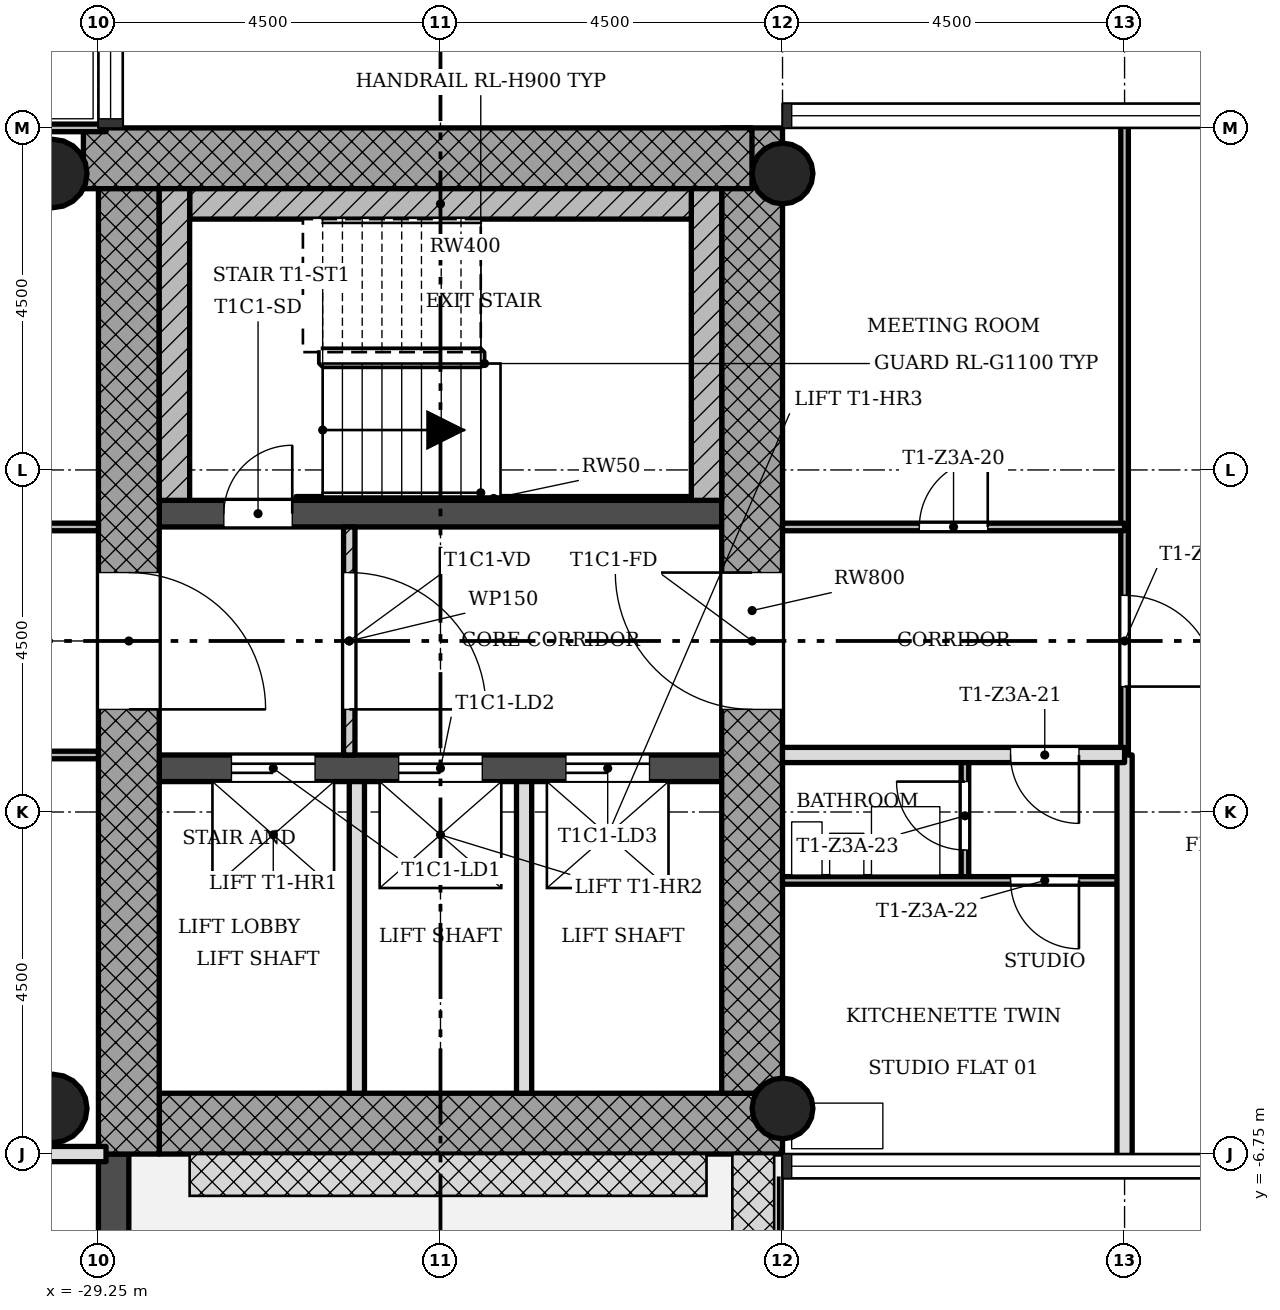
"""IFC4 building model, lengths in metres.
Left out: names, types, materials, properties, quantities, classifications, styles, units other than length and angle.
Written with IfcOpenShell. Run it as: python <this file> out.ifc"""

import sys

from ifc_helpers import new_model, si_unit, direction, frame, frame_2d, origin, origin_2d, place, context, subcontext, project, spatial, rectangle, hollow_circle, extrude, element, fill, save


model = new_model("IFC4")
c1 = context("Model", 3, precision=1e-05, world=origin(), true_north=direction((0.0, 1.0)))
c2 = subcontext(c1, "Body", "Model", "MODEL_VIEW")
j1 = project(units=[si_unit("LENGTHUNIT", "METRE"), si_unit("PLANEANGLEUNIT", "RADIAN")], contexts=[c1])
p1 = place(None, origin())
s1 = spatial("IfcSite", under=j1, at=p1, CompositionType="ELEMENT")
p2 = place(p1, origin())
s2 = spatial("IfcBuilding", under=s1, at=p2, CompositionType="ELEMENT")
p3 = place(p2, frame((0.0, 0.0, 140.5)))
s3 = spatial("IfcBuildingStorey", under=s2, at=p3, CompositionType="ELEMENT", Elevation=140.5)
p4 = place(p3, frame((-28.45, -6.35, 0.0), z_axis=(0.0, 0.0, 1.0), x_axis=(1.0, 0.0, 0.0)))
e1 = element("IfcWall", 1, at=p4, inside=s3, PredefinedType="SHEAR", context=c2, shape_type="SweptSolid", body=[
    extrude(rectangle(XDim=8.2, YDim=0.8, at=frame_2d((4.1, 0.0))), origin(), (0.0, 0.0, 1.0), 3.4),
])
p5 = place(p3, frame((-20.65, -5.95, 0.0), z_axis=(0.0, 0.0, 1.0), x_axis=(0.0, 1.0, 0.0)))
e2 = element("IfcWall", 2, at=p5, inside=s3, PredefinedType="SHEAR", context=c2, shape_type="SweptSolid", body=[
    extrude(rectangle(XDim=12.7, YDim=0.8, at=frame_2d((6.35, 0.0))), origin(), (0.0, 0.0, 1.0), 3.4),
])
p6 = place(p5, frame((5.05, 0.0, 0.0)))
e3 = element("IfcOpeningElement", 3, at=p6, cuts=e2, PredefinedType="OPENING", context=c2, shape_type="SweptSolid", body=[
    extrude(rectangle(XDim=1.8, YDim=2.1, at=frame_2d((0.9, 1.05))), frame((0.0, 0.41, 0.0), z_axis=(0.0, -1.0, 0.0), x_axis=(1.0, 0.0, 0.0)), (0.0, 0.0, 1.0), 0.82),
])
p7 = place(p3, frame((-20.652, 6.35, 0.0), z_axis=(0.0, 0.0, 1.0), x_axis=(-1.0, 0.0, 0.0)))
e4 = element("IfcWall", 4, at=p7, inside=s3, PredefinedType="SHEAR", context=c2, shape_type="SweptSolid", body=[
    extrude(rectangle(XDim=8.796, YDim=0.8, at=frame_2d((4.398, 0.0))), origin(), (0.0, 0.0, 1.0), 3.4),
])
p8 = place(p3, frame((-28.85, 5.95, 0.0), z_axis=(0.0, 0.0, 1.0), x_axis=(0.0, -1.0, 0.0)))
e5 = element("IfcWall", 5, at=p8, inside=s3, PredefinedType="SHEAR", context=c2, shape_type="SweptSolid", body=[
    extrude(rectangle(XDim=12.7, YDim=0.8, at=frame_2d((6.35, 0.0))), origin(), (0.0, 0.0, 1.0), 3.4),
])
p9 = place(p8, frame((5.05, 0.0, 0.0)))
e6 = element("IfcOpeningElement", 6, at=p9, cuts=e5, PredefinedType="OPENING", context=c2, shape_type="SweptSolid", body=[
    extrude(rectangle(XDim=1.8, YDim=2.1, at=frame_2d((0.9, 1.05))), frame((0.0, 0.41, 0.0), z_axis=(0.0, -1.0, 0.0), x_axis=(1.0, 0.0, 0.0)), (0.0, 0.0, 1.0), 0.82),
])
p10 = place(p3, frame((-28.45, -1.675, 0.0), z_axis=(0.0, 0.0, 1.0), x_axis=(1.0, 0.0, 0.0)))
e7 = element("IfcWall", 7, at=p10, inside=s3, PredefinedType="SHEAR", context=c2, shape_type="SweptSolid", body=[
    extrude(rectangle(XDim=7.4, YDim=0.35, at=frame_2d((3.7, 0.0))), origin(), (0.0, 0.0, 1.0), 3.4),
])
p11 = place(p10, frame((0.95, 0.0, 0.0)))
e8 = element("IfcOpeningElement", 8, at=p11, cuts=e7, PredefinedType="OPENING", context=c2, shape_type="SweptSolid", body=[
    extrude(rectangle(XDim=1.1, YDim=2.1, at=frame_2d((0.55, 1.05))), frame((0.0, 0.185, 0.0), z_axis=(0.0, -1.0, 0.0), x_axis=(1.0, 0.0, 0.0)), (0.0, 0.0, 1.0), 0.37),
])
p12 = place(p10, frame((3.15, 0.0, 0.0)))
e9 = element("IfcOpeningElement", 9, at=p12, cuts=e7, PredefinedType="OPENING", context=c2, shape_type="SweptSolid", body=[
    extrude(rectangle(XDim=1.1, YDim=2.1, at=frame_2d((0.55, 1.05))), frame((0.0, 0.185, 0.0), z_axis=(0.0, -1.0, 0.0), x_axis=(1.0, 0.0, 0.0)), (0.0, 0.0, 1.0), 0.37),
])
p13 = place(p10, frame((5.35, 0.0, 0.0)))
e10 = element("IfcOpeningElement", 10, at=p13, cuts=e7, PredefinedType="OPENING", context=c2, shape_type="SweptSolid", body=[
    extrude(rectangle(XDim=1.1, YDim=2.1, at=frame_2d((0.55, 1.05))), frame((0.0, 0.185, 0.0), z_axis=(0.0, -1.0, 0.0), x_axis=(1.0, 0.0, 0.0)), (0.0, 0.0, 1.0), 0.37),
])
p14 = place(p3, frame((-28.45, 1.675, 0.0), z_axis=(0.0, 0.0, 1.0), x_axis=(1.0, 0.0, 0.0)))
e11 = element("IfcWall", 11, at=p14, inside=s3, PredefinedType="SHEAR", context=c2, shape_type="SweptSolid", body=[
    extrude(rectangle(XDim=7.4, YDim=0.35, at=frame_2d((3.7, 0.0))), origin(), (0.0, 0.0, 1.0), 3.4),
])
p15 = place(p14, frame((0.85, 0.0, 0.0)))
e12 = element("IfcOpeningElement", 12, at=p15, cuts=e11, PredefinedType="OPENING", context=c2, shape_type="SweptSolid", body=[
    extrude(rectangle(XDim=0.9, YDim=2.1, at=frame_2d((0.45, 1.05))), frame((0.0, 0.185, 0.0), z_axis=(0.0, -1.0, 0.0), x_axis=(1.0, 0.0, 0.0)), (0.0, 0.0, 1.0), 0.37),
])
for number, where, z_axis, x_axis in (
    (13, (-20.25, -6.15, 0.0), (0.0, 0.0, 1.0), (1.0, 0.0, 0.0)),
    (14, (-20.25, 6.15, 0.0), (0.0, 0.0, 1.0), (1.0, 0.0, 0.0)),
):
    element("IfcColumn", number, at=place(p3, frame(where, z_axis=z_axis, x_axis=x_axis)), inside=s3, PredefinedType="COLUMN", context=c2, shape_type="SweptSolid", body=[
        extrude(hollow_circle(Radius=0.4, WallThickness=0.028, at=origin_2d()), origin(), (0.0, 0.0, 1.0), 3.4),
    ])
for number, where, z_axis, x_axis in (
    (15, (-29.85, -6.15, 0.0), (0.0, 0.0, 1.0), (1.0, 0.0, 0.0)),
    (16, (-29.85, 6.15, 0.0), (0.0, 0.0, 1.0), (1.0, 0.0, 0.0)),
):
    element("IfcColumn", number, at=place(p3, frame(where, z_axis=z_axis, x_axis=x_axis)), inside=s3, PredefinedType="COLUMN", context=c2, shape_type="SweptSolid", body=[
        extrude(hollow_circle(Radius=0.45, WallThickness=0.032, at=origin_2d()), origin(), (0.0, 0.0, 1.0), 3.4),
    ])
p16 = place(p3, frame((-29.05, -11.25, -0.02), z_axis=(0.0, 0.0, 1.0), x_axis=(0.0, 1.0, 0.0)))
e17 = element("IfcWall", 17, at=p16, inside=s3, PredefinedType="STANDARD", context=c2, shape_type="SweptSolid", body=[
    extrude(rectangle(XDim=4.5, YDim=0.4, at=frame_2d((2.25, 0.0))), origin(), (0.0, 0.0, 1.0), 3.12),
])
p17 = place(p16, frame((1.35, 0.0, 0.02)))
e18 = element("IfcOpeningElement", 18, at=p17, cuts=e17, PredefinedType="OPENING", context=c2, shape_type="SweptSolid", body=[
    extrude(rectangle(XDim=1.8, YDim=2.1, at=frame_2d((0.9, 1.05))), frame((0.0, 0.21, 0.0), z_axis=(0.0, -1.0, 0.0), x_axis=(1.0, 0.0, 0.0)), (0.0, 0.0, 1.0), 0.42),
])
p18 = place(p3, frame((-25.95, -1.5, 0.0), z_axis=(0.0, 0.0, 1.0), x_axis=(0.0, 1.0, 0.0)))
e19 = element("IfcWall", 19, at=p18, inside=s3, PredefinedType="PARTITIONING", context=c2, shape_type="SweptSolid", body=[
    extrude(rectangle(XDim=3.0, YDim=0.15, at=frame_2d((1.5, 0.0))), origin(), (0.0, 0.0, 1.0), 3.0),
])
p19 = place(p18, frame((0.6, 0.0, 0.0)))
e20 = element("IfcOpeningElement", 20, at=p19, cuts=e19, PredefinedType="OPENING", context=c2, shape_type="SweptSolid", body=[
    extrude(rectangle(XDim=1.8, YDim=2.1, at=frame_2d((0.9, 1.05))), frame((0.0, 0.085, 0.0), z_axis=(0.0, -1.0, 0.0), x_axis=(1.0, 0.0, 0.0)), (0.0, 0.0, 1.0), 0.17),
])
for number, where, z_axis, x_axis in (
    (21, (-25.85, -5.95, 0.0), (0.0, 0.0, 1.0), (0.0, 1.0, 0.0)),
    (22, (-23.65, -5.95, 0.0), (0.0, 0.0, 1.0), (0.0, 1.0, 0.0)),
):
    element("IfcWall", number, at=place(p3, frame(where, z_axis=z_axis, x_axis=x_axis)), inside=s3, PredefinedType="SOLIDWALL", context=c2, shape_type="SweptSolid", body=[
        extrude(rectangle(XDim=4.1, YDim=0.2, at=frame_2d((2.05, 0.0))), origin(), (0.0, 0.0, 1.0), 3.0),
    ])
p20 = place(p3, frame((-17.85, -3.15, 0.0), z_axis=(0.0, 0.0, 1.0), x_axis=(0.0, 1.0, 0.0)))
e23 = element("IfcWall", 23, at=p20, inside=s3, PredefinedType="PARTITIONING", context=c2, shape_type="SweptSolid", body=[
    extrude(rectangle(XDim=1.65, YDim=0.1, at=frame_2d((0.825, 0.0))), origin(), (0.0, 0.0, 1.0), 3.0),
])
p21 = place(p20, frame((0.4, 0.0, 0.0)))
e24 = element("IfcOpeningElement", 24, at=p21, cuts=e23, PredefinedType="OPENING", context=c2, shape_type="SweptSolid", body=[
    extrude(rectangle(XDim=0.9, YDim=2.1, at=frame_2d((0.45, 1.05))), frame((0.0, 0.06, 0.0), z_axis=(0.0, -1.0, 0.0), x_axis=(1.0, 0.0, 0.0)), (0.0, 0.0, 1.0), 0.12),
])
p22 = place(p3, frame((-15.75, -1.5, 0.0), z_axis=(0.0, 0.0, 1.0), x_axis=(0.0, 1.0, 0.0)))
e25 = element("IfcWall", 25, at=p22, inside=s3, PredefinedType="PARTITIONING", context=c2, shape_type="SweptSolid", body=[
    extrude(rectangle(XDim=8.35, YDim=0.1, at=frame_2d((4.175, 0.0))), origin(), (0.0, 0.0, 1.0), 3.0),
])
p23 = place(p22, frame((0.9, 0.0, 0.0)))
e26 = element("IfcOpeningElement", 26, at=p23, cuts=e25, PredefinedType="OPENING", context=c2, shape_type="SweptSolid", body=[
    extrude(rectangle(XDim=1.2, YDim=2.1, at=frame_2d((0.6, 1.05))), frame((0.0, 0.06, 0.0), z_axis=(0.0, -1.0, 0.0), x_axis=(1.0, 0.0, 0.0)), (0.0, 0.0, 1.0), 0.12),
])
p24 = place(p3, frame((-15.75, -6.85, 0.0), z_axis=(0.0, 0.0, 1.0), x_axis=(0.0, 1.0, 0.0)))
e27 = element("IfcWall", 27, at=p24, inside=s3, PredefinedType="SOLIDWALL", context=c2, shape_type="SweptSolid", body=[
    extrude(rectangle(XDim=5.35, YDim=0.2, at=frame_2d((2.675, 0.0))), origin(), (0.0, 0.0, 1.0), 3.0),
])
p25 = place(p3, frame((-42.85, -6.75, 0.0), z_axis=(0.0, 0.0, 1.0), x_axis=(1.0, 0.0, 0.0)))
e28 = element("IfcWall", 28, at=p25, inside=s3, PredefinedType="SOLIDWALL", context=c2, shape_type="SweptSolid", body=[
    extrude(rectangle(XDim=13.7, YDim=0.2, at=frame_2d((6.85, 0.0))), origin(), (0.0, 0.0, 1.0), 3.0),
])
p26 = place(p25, frame((6.4, 0.0, 0.0)))
e29 = element("IfcOpeningElement", 29, at=p26, cuts=e28, PredefinedType="OPENING", context=c2, shape_type="SweptSolid", body=[
    extrude(rectangle(XDim=0.9, YDim=2.1, at=frame_2d((0.45, 1.05))), frame((0.0, 0.11, 0.0), z_axis=(0.0, -1.0, 0.0), x_axis=(1.0, 0.0, 0.0)), (0.0, 0.0, 1.0), 0.22),
])
p27 = place(p3, frame((-20.25, -3.15, 0.0), z_axis=(0.0, 0.0, 1.0), x_axis=(1.0, 0.0, 0.0)))
e30 = element("IfcWall", 30, at=p27, inside=s3, PredefinedType="PARTITIONING", context=c2, shape_type="SweptSolid", body=[
    extrude(rectangle(XDim=4.5, YDim=0.1, at=frame_2d((2.25, 0.0))), origin(), (0.0, 0.0, 1.0), 3.0),
])
p28 = place(p27, frame((3.0, 0.0, 0.0)))
e31 = element("IfcOpeningElement", 31, at=p28, cuts=e30, PredefinedType="OPENING", context=c2, shape_type="SweptSolid", body=[
    extrude(rectangle(XDim=0.9, YDim=2.1, at=frame_2d((0.45, 1.05))), frame((0.0, 0.06, 0.0), z_axis=(0.0, -1.0, 0.0), x_axis=(1.0, 0.0, 0.0)), (0.0, 0.0, 1.0), 0.12),
])
p29 = place(p3, frame((-31.5, -1.5, 0.0), z_axis=(0.0, 0.0, 1.0), x_axis=(1.0, 0.0, 0.0)))
e32 = element("IfcWall", 32, at=p29, inside=s3, PredefinedType="PARTITIONING", context=c2, shape_type="SweptSolid", body=[
    extrude(rectangle(XDim=2.25, YDim=0.1, at=frame_2d((1.125, 0.0))), origin(), (0.0, 0.0, 1.0), 3.0),
])
p30 = place(p3, frame((-20.25, -1.5, 0.0), z_axis=(0.0, 0.0, 1.0), x_axis=(1.0, 0.0, 0.0)))
e33 = element("IfcWall", 33, at=p30, inside=s3, PredefinedType="SOLIDWALL", context=c2, shape_type="SweptSolid", body=[
    extrude(rectangle(XDim=4.5, YDim=0.2, at=frame_2d((2.25, 0.0))), origin(), (0.0, 0.0, 1.0), 3.0),
])
p31 = place(p30, frame((3.0, 0.0, 0.0)))
e34 = element("IfcOpeningElement", 34, at=p31, cuts=e33, PredefinedType="OPENING", context=c2, shape_type="SweptSolid", body=[
    extrude(rectangle(XDim=0.9, YDim=2.1, at=frame_2d((0.45, 1.05))), frame((0.0, 0.11, 0.0), z_axis=(0.0, -1.0, 0.0), x_axis=(1.0, 0.0, 0.0)), (0.0, 0.0, 1.0), 0.22),
])
p32 = place(p3, frame((-31.5, 1.5, 0.0), z_axis=(0.0, 0.0, 1.0), x_axis=(1.0, 0.0, 0.0)))
e35 = element("IfcWall", 35, at=p32, inside=s3, PredefinedType="PARTITIONING", context=c2, shape_type="SweptSolid", body=[
    extrude(rectangle(XDim=2.25, YDim=0.1, at=frame_2d((1.125, 0.0))), origin(), (0.0, 0.0, 1.0), 3.0),
])
p33 = place(p3, frame((-20.25, 1.5, 0.0), z_axis=(0.0, 0.0, 1.0), x_axis=(1.0, 0.0, 0.0)))
e36 = element("IfcWall", 36, at=p33, inside=s3, PredefinedType="PARTITIONING", context=c2, shape_type="SweptSolid", body=[
    extrude(rectangle(XDim=4.5, YDim=0.1, at=frame_2d((2.25, 0.0))), origin(), (0.0, 0.0, 1.0), 3.0),
])
p34 = place(p33, frame((1.8, 0.0, 0.0)))
e37 = element("IfcOpeningElement", 37, at=p34, cuts=e36, PredefinedType="OPENING", context=c2, shape_type="SweptSolid", body=[
    extrude(rectangle(XDim=0.9, YDim=2.1, at=frame_2d((0.45, 1.05))), frame((0.0, 0.06, 0.0), z_axis=(0.0, -1.0, 0.0), x_axis=(1.0, 0.0, 0.0)), (0.0, 0.0, 1.0), 0.12),
])
p35 = place(p3, frame((-35.1, 6.75, 0.0), z_axis=(0.0, 0.0, 1.0), x_axis=(1.0, 0.0, 0.0)))
e38 = element("IfcWall", 38, at=p35, inside=s3, PredefinedType="PARTITIONING", context=c2, shape_type="SweptSolid", body=[
    extrude(rectangle(XDim=5.95, YDim=0.1, at=frame_2d((2.975, 0.0))), origin(), (0.0, 0.0, 1.0), 3.0),
])
p36 = place(p3, frame((-21.25, 1.85, 0.0), z_axis=(0.0, 0.0, 1.0), x_axis=(0.0, 1.0, 0.0)))
e39 = element("IfcWall", 39, at=p36, inside=s3, PredefinedType="SHEAR", context=c2, shape_type="SweptSolid", body=[
    extrude(rectangle(XDim=4.1, YDim=0.4, at=frame_2d((2.05, 0.0))), origin(), (0.0, 0.0, 1.0), 3.4),
])
p37 = place(p3, frame((-28.05, 5.75, 0.0), z_axis=(0.0, 0.0, 1.0), x_axis=(1.0, 0.0, 0.0)))
e40 = element("IfcWall", 40, at=p37, inside=s3, PredefinedType="SHEAR", context=c2, shape_type="SweptSolid", body=[
    extrude(rectangle(XDim=6.6, YDim=0.4, at=frame_2d((3.3, 0.0))), origin(), (0.0, 0.0, 1.0), 3.4),
])
p38 = place(p3, frame((-28.25, 1.85, 0.0), z_axis=(0.0, 0.0, 1.0), x_axis=(0.0, 1.0, 0.0)))
e41 = element("IfcWall", 41, at=p38, inside=s3, PredefinedType="SHEAR", context=c2, shape_type="SweptSolid", body=[
    extrude(rectangle(XDim=4.1, YDim=0.4, at=frame_2d((2.05, 0.0))), origin(), (0.0, 0.0, 1.0), 3.4),
])
p39 = place(p3, frame((-26.65, 1.875, 0.0), z_axis=(0.0, 0.0, 1.0), x_axis=(1.0, 0.0, 0.0)))
e42 = element("IfcWall", 42, at=p39, inside=s3, PredefinedType="SHEAR", context=c2, shape_type="SweptSolid", body=[
    extrude(rectangle(XDim=5.2, YDim=0.05, at=frame_2d((2.6, 0.0))), origin(), (0.0, 0.0, 1.0), 3.4),
])
p40 = place(p19, origin())
e43 = element("IfcDoor", 43, at=p40, inside=s3, OperationType="SINGLE_SWING_LEFT", PredefinedType="DOOR", context=c2, shape_type="SweptSolid", body=[
    extrude(rectangle(XDim=1.8, YDim=2.1, at=frame_2d((0.9, 1.05))), frame((0.0, 0.025, 0.0), z_axis=(0.0, -1.0, 0.0), x_axis=(1.0, 0.0, 0.0)), (0.0, 0.0, 1.0), 0.05),
])
fill(e20, e43)
p41 = place(p34, origin())
e44 = element("IfcDoor", 44, at=p41, inside=s3, OperationType="SINGLE_SWING_LEFT", PredefinedType="DOOR", context=c2, shape_type="SweptSolid", body=[
    extrude(rectangle(XDim=0.9, YDim=2.1, at=frame_2d((0.45, 1.05))), frame((0.0, 0.025, 0.0), z_axis=(0.0, -1.0, 0.0), x_axis=(1.0, 0.0, 0.0)), (0.0, 0.0, 1.0), 0.05),
])
fill(e37, e44)
p42 = place(p31, origin())
e45 = element("IfcDoor", 45, at=p42, inside=s3, OperationType="SINGLE_SWING_RIGHT", PredefinedType="DOOR", context=c2, shape_type="SweptSolid", body=[
    extrude(rectangle(XDim=0.9, YDim=2.1, at=frame_2d((0.45, 1.05))), frame((0.0, 0.025, 0.0), z_axis=(0.0, -1.0, 0.0), x_axis=(1.0, 0.0, 0.0)), (0.0, 0.0, 1.0), 0.05),
])
fill(e34, e45)
p43 = place(p28, origin())
e46 = element("IfcDoor", 46, at=p43, inside=s3, OperationType="SINGLE_SWING_RIGHT", PredefinedType="DOOR", context=c2, shape_type="SweptSolid", body=[
    extrude(rectangle(XDim=0.9, YDim=2.1, at=frame_2d((0.45, 1.05))), frame((0.0, 0.025, 0.0), z_axis=(0.0, -1.0, 0.0), x_axis=(1.0, 0.0, 0.0)), (0.0, 0.0, 1.0), 0.05),
])
fill(e31, e46)
p44 = place(p21, origin())
e47 = element("IfcDoor", 47, at=p44, inside=s3, OperationType="SINGLE_SWING_LEFT", PredefinedType="DOOR", context=c2, shape_type="SweptSolid", body=[
    extrude(rectangle(XDim=0.9, YDim=2.1, at=frame_2d((0.45, 1.05))), frame((0.0, 0.025, 0.0), z_axis=(0.0, -1.0, 0.0), x_axis=(1.0, 0.0, 0.0)), (0.0, 0.0, 1.0), 0.05),
])
fill(e24, e47)
p45 = place(p23, origin())
e48 = element("IfcDoor", 48, at=p45, inside=s3, OperationType="SINGLE_SWING_LEFT", PredefinedType="DOOR", context=c2, shape_type="SweptSolid", body=[
    extrude(rectangle(XDim=1.2, YDim=2.1, at=frame_2d((0.6, 1.05))), frame((0.0, 0.025, 0.0), z_axis=(0.0, -1.0, 0.0), x_axis=(1.0, 0.0, 0.0)), (0.0, 0.0, 1.0), 0.05),
])
fill(e26, e48)
p46 = place(p15, origin())
e49 = element("IfcDoor", 49, at=p46, inside=s3, OperationType="SINGLE_SWING_LEFT", PredefinedType="DOOR", context=c2, shape_type="SweptSolid", body=[
    extrude(rectangle(XDim=0.9, YDim=2.1, at=frame_2d((0.45, 1.05))), frame((0.0, 0.025, 0.0), z_axis=(0.0, -1.0, 0.0), x_axis=(1.0, 0.0, 0.0)), (0.0, 0.0, 1.0), 0.05),
])
fill(e12, e49)
p47 = place(p11, origin())
e50 = element("IfcDoor", 50, at=p47, inside=s3, OperationType="SLIDING_TO_LEFT", PredefinedType="DOOR", context=c2, shape_type="SweptSolid", body=[
    extrude(rectangle(XDim=1.1, YDim=2.1, at=frame_2d((0.55, 1.05))), frame((0.0, 0.025, 0.0), z_axis=(0.0, -1.0, 0.0), x_axis=(1.0, 0.0, 0.0)), (0.0, 0.0, 1.0), 0.05),
])
fill(e8, e50)
p48 = place(p12, origin())
e51 = element("IfcDoor", 51, at=p48, inside=s3, OperationType="SLIDING_TO_LEFT", PredefinedType="DOOR", context=c2, shape_type="SweptSolid", body=[
    extrude(rectangle(XDim=1.1, YDim=2.1, at=frame_2d((0.55, 1.05))), frame((0.0, 0.025, 0.0), z_axis=(0.0, -1.0, 0.0), x_axis=(1.0, 0.0, 0.0)), (0.0, 0.0, 1.0), 0.05),
])
fill(e9, e51)
p49 = place(p13, origin())
e52 = element("IfcDoor", 52, at=p49, inside=s3, OperationType="SLIDING_TO_LEFT", PredefinedType="DOOR", context=c2, shape_type="SweptSolid", body=[
    extrude(rectangle(XDim=1.1, YDim=2.1, at=frame_2d((0.55, 1.05))), frame((0.0, 0.025, 0.0), z_axis=(0.0, -1.0, 0.0), x_axis=(1.0, 0.0, 0.0)), (0.0, 0.0, 1.0), 0.05),
])
fill(e10, e52)
p50 = place(p9, origin())
e53 = element("IfcDoor", 53, at=p50, inside=s3, OperationType="SINGLE_SWING_LEFT", PredefinedType="DOOR", context=c2, shape_type="SweptSolid", body=[
    extrude(rectangle(XDim=1.8, YDim=2.1, at=frame_2d((0.9, 1.05))), frame((0.0, 0.025, 0.0), z_axis=(0.0, -1.0, 0.0), x_axis=(1.0, 0.0, 0.0)), (0.0, 0.0, 1.0), 0.05),
])
fill(e6, e53)
p51 = place(p6, origin())
e54 = element("IfcDoor", 54, at=p51, inside=s3, OperationType="SINGLE_SWING_LEFT", PredefinedType="DOOR", context=c2, shape_type="SweptSolid", body=[
    extrude(rectangle(XDim=1.8, YDim=2.1, at=frame_2d((0.9, 1.05))), frame((0.0, 0.025, 0.0), z_axis=(0.0, -1.0, 0.0), x_axis=(1.0, 0.0, 0.0)), (0.0, 0.0, 1.0), 0.05),
])
fill(e3, e54)
save(model, sys.argv[1])
